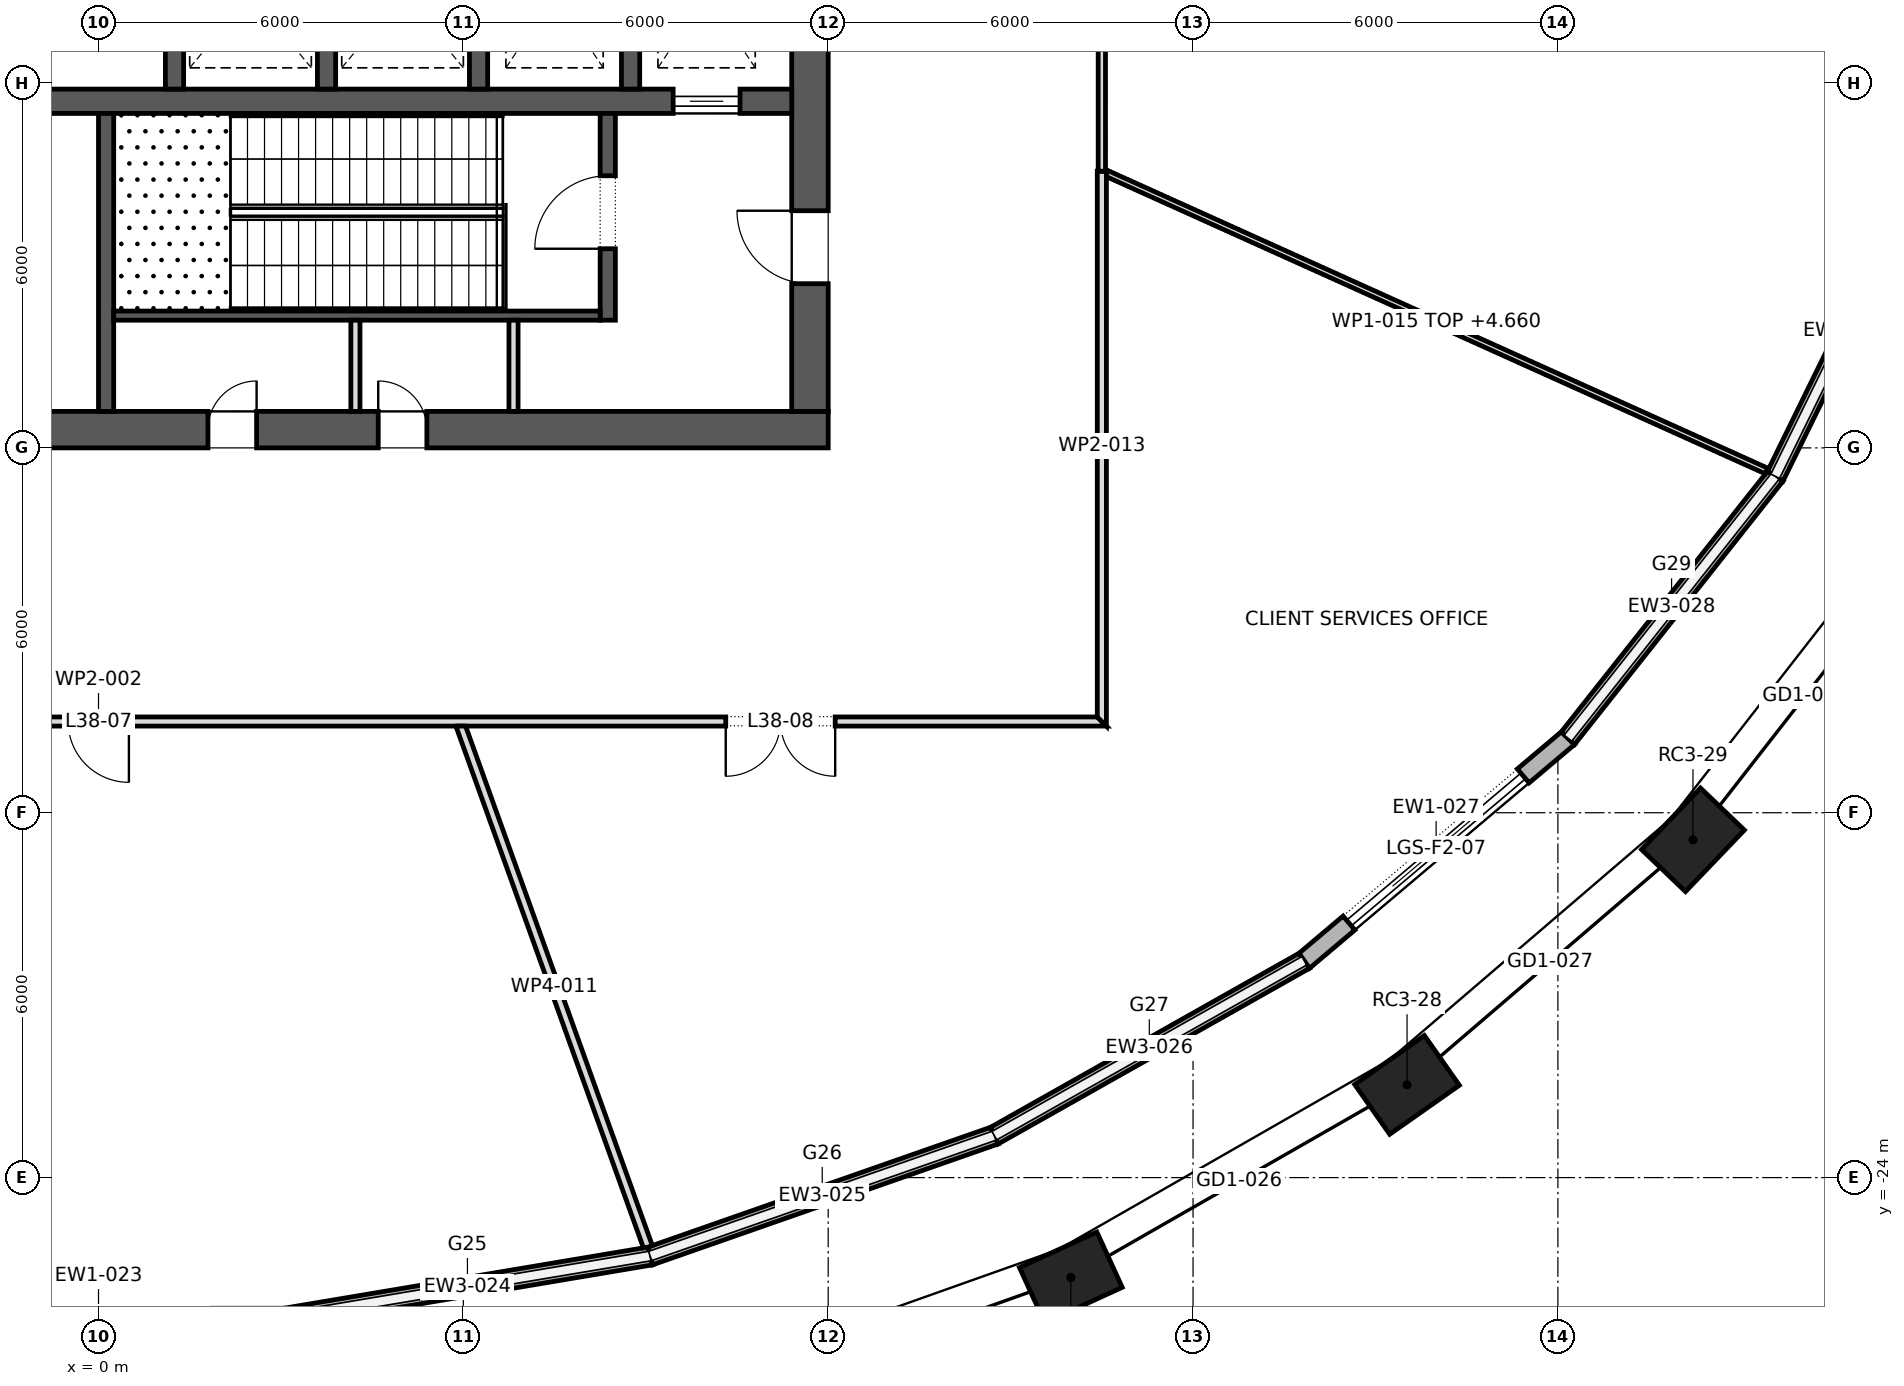
"""IFC4 building model, lengths in metres.
Left out: names, types, materials, properties, quantities, classifications, styles, units other than length and angle.
Written with IfcOpenShell. Run it as: python <this file> out.ifc"""

import sys

from ifc_helpers import new_model, si_unit, direction, frame, frame_2d, origin, origin_2d, place, context, subcontext, project, spatial, polyline, rectangle, outline, extrude, element, fill, save


model = new_model("IFC4")
c1 = context("Model", 3, precision=1e-05, world=origin(), true_north=direction((0.0, 1.0)))
c2 = subcontext(c1, "Body", "Model", "MODEL_VIEW")
j1 = project(units=[si_unit("LENGTHUNIT", "METRE"), si_unit("PLANEANGLEUNIT", "RADIAN")], contexts=[c1])
p1 = place(None, origin())
s1 = spatial("IfcSite", under=j1, at=p1, CompositionType="ELEMENT")
p2 = place(p1, origin())
s2 = spatial("IfcBuilding", under=s1, at=p2, CompositionType="ELEMENT")
p3 = place(p2, frame((0.0, 0.0, 167.5)))
s3 = spatial("IfcBuildingStorey", under=s2, at=p3, CompositionType="ELEMENT", Elevation=167.5)
for number, where, z_axis, x_axis in (
    (1, (15.99, -25.642, 0.0), (0.0, 0.0, 1.0), (0.909, 0.417, 0.0)),
    (2, (21.519, -22.475, 0.0), (0.0, 0.0, 1.0), (0.818, 0.575, 0.0)),
    (3, (26.221, -18.445, 0.0), (0.0, 0.0, 1.0), (0.692, 0.722, 0.0)),
):
    element("IfcColumn", number, at=place(p3, frame(where, z_axis=z_axis, x_axis=x_axis)), inside=s3, PredefinedType="COLUMN", context=c2, shape_type="SweptSolid", body=[
        extrude(rectangle(XDim=1.4, YDim=1.0, at=origin_2d()), origin(), (0.0, 0.0, 1.0), 6.0),
    ])
p4 = place(p3, frame((-12.0, -11.7, 0.0), z_axis=(0.0, 0.0, 1.0), x_axis=(1.0, 0.0, 0.0)))
e4 = element("IfcWall", 4, at=p4, inside=s3, PredefinedType="SHEAR", context=c2, shape_type="SweptSolid", body=[
    extrude(rectangle(XDim=24.0, YDim=0.6, at=frame_2d((12.0, 0.0))), origin(), (0.0, 0.0, 1.0), 6.0),
])
p5 = place(p4, frame((9.975, 0.0, 0.0)))
e5 = element("IfcOpeningElement", 5, at=p5, cuts=e4, PredefinedType="OPENING", context=c2, shape_type="SweptSolid", body=[
    extrude(rectangle(XDim=0.9, YDim=2.1, at=frame_2d((0.45, 1.05))), frame((0.0, 0.312, 0.0), z_axis=(0.0, -1.0, 0.0), x_axis=(1.0, 0.0, 0.0)), (0.0, 0.0, 1.0), 0.624),
])
p6 = place(p4, frame((4.2, 0.0, 0.0)))
e6 = element("IfcOpeningElement", 6, at=p6, cuts=e4, PredefinedType="OPENING", context=c2, shape_type="SweptSolid", body=[
    extrude(rectangle(XDim=0.8, YDim=2.1, at=frame_2d((0.4, 1.05))), frame((0.0, 0.312, 0.0), z_axis=(0.0, -1.0, 0.0), x_axis=(1.0, 0.0, 0.0)), (0.0, 0.0, 1.0), 0.624),
])
p7 = place(p4, frame((13.8, 0.0, 0.0)))
e7 = element("IfcOpeningElement", 7, at=p7, cuts=e4, PredefinedType="OPENING", context=c2, shape_type="SweptSolid", body=[
    extrude(rectangle(XDim=0.8, YDim=2.1, at=frame_2d((0.4, 1.05))), frame((0.0, 0.312, 0.0), z_axis=(0.0, -1.0, 0.0), x_axis=(1.0, 0.0, 0.0)), (0.0, 0.0, 1.0), 0.624),
])
p8 = place(p4, frame((16.6, 0.0, 0.0)))
e8 = element("IfcOpeningElement", 8, at=p8, cuts=e4, PredefinedType="OPENING", context=c2, shape_type="SweptSolid", body=[
    extrude(rectangle(XDim=0.8, YDim=2.1, at=frame_2d((0.4, 1.05))), frame((0.0, 0.312, 0.0), z_axis=(0.0, -1.0, 0.0), x_axis=(1.0, 0.0, 0.0)), (0.0, 0.0, 1.0), 0.624),
])
p9 = place(p3, frame((11.7, -11.4, 0.0), z_axis=(0.0, 0.0, 1.0), x_axis=(0.0, 1.0, 0.0)))
e9 = element("IfcWall", 9, at=p9, inside=s3, PredefinedType="SHEAR", context=c2, shape_type="SweptSolid", body=[
    extrude(rectangle(XDim=22.8, YDim=0.6, at=frame_2d((11.4, 0.0))), origin(), (0.0, 0.0, 1.0), 6.0),
])
p10 = place(p9, frame((10.2, 0.0, 0.0)))
e10 = element("IfcOpeningElement", 10, at=p10, cuts=e9, PredefinedType="OPENING", context=c2, shape_type="SweptSolid", body=[
    extrude(rectangle(XDim=2.4, YDim=2.1, at=frame_2d((1.2, 1.05))), frame((0.0, 0.312, 0.0), z_axis=(0.0, -1.0, 0.0), x_axis=(1.0, 0.0, 0.0)), (0.0, 0.0, 1.0), 0.624),
])
p11 = place(p9, frame((19.5, 0.0, 0.0)))
e11 = element("IfcOpeningElement", 11, at=p11, cuts=e9, PredefinedType="OPENING", context=c2, shape_type="SweptSolid", body=[
    extrude(rectangle(XDim=1.2, YDim=2.1, at=frame_2d((0.6, 1.05))), frame((0.0, 0.312, 0.0), z_axis=(0.0, -1.0, 0.0), x_axis=(1.0, 0.0, 0.0)), (0.0, 0.0, 1.0), 0.624),
])
p12 = place(p9, frame((2.1, 0.0, 0.0)))
e12 = element("IfcOpeningElement", 12, at=p12, cuts=e9, PredefinedType="OPENING", context=c2, shape_type="SweptSolid", body=[
    extrude(rectangle(XDim=1.2, YDim=2.1, at=frame_2d((0.6, 1.05))), frame((0.0, 0.312, 0.0), z_axis=(0.0, -1.0, 0.0), x_axis=(1.0, 0.0, 0.0)), (0.0, 0.0, 1.0), 0.624),
])
p13 = place(p3, frame((-11.4, -6.3, 0.0), z_axis=(0.0, 0.0, 1.0), x_axis=(1.0, 0.0, 0.0)))
e13 = element("IfcWall", 13, at=p13, inside=s3, PredefinedType="SHEAR", context=c2, shape_type="SweptSolid", body=[
    extrude(rectangle(XDim=22.8, YDim=0.4, at=frame_2d((11.4, 0.0))), origin(), (0.0, 0.0, 1.0), 6.0),
])
p14 = place(p13, frame((20.85, 0.0, 0.0)))
e14 = element("IfcOpeningElement", 14, at=p14, cuts=e13, PredefinedType="OPENING", context=c2, shape_type="SweptSolid", body=[
    extrude(rectangle(XDim=1.1, YDim=2.1, at=frame_2d((0.55, 1.05))), frame((0.0, 0.212, 0.0), z_axis=(0.0, -1.0, 0.0), x_axis=(1.0, 0.0, 0.0)), (0.0, 0.0, 1.0), 0.424),
])
for number, where, z_axis, x_axis in (
    (15, (1.25, -6.1, 0.0), (0.0, 0.0, 1.0), (0.0, 1.0, 0.0)),
    (16, (3.75, -6.1, 0.0), (0.0, 0.0, 1.0), (0.0, 1.0, 0.0)),
    (17, (6.25, -6.1, 0.0), (0.0, 0.0, 1.0), (0.0, 1.0, 0.0)),
    (18, (8.75, -6.1, 0.0), (0.0, 0.0, 1.0), (0.0, 1.0, 0.0)),
):
    element("IfcWall", number, at=place(p3, frame(where, z_axis=z_axis, x_axis=x_axis)), inside=s3, PredefinedType="SHEAR", context=c2, shape_type="SweptSolid", body=[
        extrude(rectangle(XDim=2.9, YDim=0.3, at=frame_2d((1.45, 0.0))), origin(), (0.0, 0.0, 1.0), 6.0),
    ])
p15 = place(p3, frame((3.063, -26.299, 5.2), z_axis=(0.0, 0.0, 1.0), x_axis=(0.98618955457, 0.165620537547, 0.0)))
e19 = element("IfcWall", 19, at=p15, inside=s3, PredefinedType="STANDARD", context=c2, shape_type="SweptSolid", body=[
    extrude(outline(polyline([(-0.012, -0.15), (6.105, -0.15), (6.08, 0.15), (0.012, 0.15), (-0.012, -0.15)])), origin(), (0.0, 0.0, 1.0), 0.45),
])
p16 = place(p3, frame((9.071, -25.29, 5.2), z_axis=(0.0, 0.0, 1.0), x_axis=(0.943944636678, 0.330103806228, 0.0)))
e20 = element("IfcWall", 20, at=p16, inside=s3, PredefinedType="STANDARD", context=c2, shape_type="SweptSolid", body=[
    extrude(outline(polyline([(-0.013, -0.15), (6.011, -0.15), (5.984, 0.15), (0.013, 0.15), (-0.013, -0.15)])), origin(), (0.0, 0.0, 1.0), 0.45),
])
p17 = place(p3, frame((14.732, -23.31, 5.2), z_axis=(0.0, 0.0, 1.0), x_axis=(0.870982130072, 0.491314694565, 0.0)))
e21 = element("IfcWall", 21, at=p17, inside=s3, PredefinedType="STANDARD", context=c2, shape_type="SweptSolid", body=[
    extrude(outline(polyline([(-0.013, -0.15), (5.866, -0.15), (5.837, 0.15), (0.013, 0.15), (-0.013, -0.15)])), origin(), (0.0, 0.0, 1.0), 0.45),
])
p18 = place(p3, frame((19.829, -20.435, 0.0), z_axis=(0.0, 0.0, 1.0), x_axis=(0.764076096085, 0.645126126732, 0.0)))
e22 = element("IfcWall", 22, at=p18, inside=s3, PredefinedType="STANDARD", context=c2, shape_type="SweptSolid", body=[
    extrude(outline(polyline([(-0.014, -0.15), (5.69, -0.15), (5.66, 0.15), (0.014, 0.15), (-0.014, -0.15)])), origin(), (0.0, 0.0, 1.0), 5.65),
])
p19 = place(p18, frame((0.962, 0.0, 0.0)))
e23 = element("IfcOpeningElement", 23, at=p19, cuts=e22, PredefinedType="OPENING", context=c2, shape_type="SweptSolid", body=[
    extrude(rectangle(XDim=3.75, YDim=5.2, at=frame_2d((1.875, 2.6))), frame((0.0, 0.162, 0.0), z_axis=(0.0, -1.0, 0.0), x_axis=(1.0, 0.0, 0.0)), (0.0, 0.0, 1.0), 0.324),
])
p20 = place(p3, frame((24.165, -16.774, 5.2), z_axis=(0.0, 0.0, 1.0), x_axis=(0.620577705153, 0.784144955902, 0.0)))
e24 = element("IfcWall", 24, at=p20, inside=s3, PredefinedType="STANDARD", context=c2, shape_type="SweptSolid", body=[
    extrude(outline(polyline([(-0.015, -0.15), (5.509, -0.15), (5.477, 0.15), (0.015, 0.15), (-0.015, -0.15)])), origin(), (0.0, 0.0, 1.0), 0.45),
])
p21 = place(p3, frame((27.574, -12.467, 5.2), z_axis=(0.0, 0.0, 1.0), x_axis=(0.440444485575, 0.897779847806, 0.0)))
e25 = element("IfcWall", 25, at=p21, inside=s3, PredefinedType="STANDARD", context=c2, shape_type="SweptSolid", body=[
    extrude(outline(polyline([(-0.016, -0.15), (5.35, -0.15), (5.317, 0.15), (0.016, 0.15), (-0.016, -0.15)])), origin(), (0.0, 0.0, 1.0), 0.45),
])
p22 = place(p3, frame((0.125, -11.4, 0.0), z_axis=(0.0, 0.0, 1.0), x_axis=(0.0, 1.0, 0.0)))
e26 = element("IfcWall", 26, at=p22, inside=s3, PredefinedType="SHEAR", context=c2, shape_type="SweptSolid", body=[
    extrude(rectangle(XDim=4.9, YDim=0.25, at=frame_2d((2.45, 0.0))), origin(), (0.0, 0.0, 1.0), 5.65),
])
p23 = place(p3, frame((8.375, -9.9, 0.0), z_axis=(0.0, 0.0, 1.0), x_axis=(0.0, 1.0, 0.0)))
e27 = element("IfcWall", 27, at=p23, inside=s3, PredefinedType="SHEAR", context=c2, shape_type="SweptSolid", body=[
    extrude(rectangle(XDim=3.4, YDim=0.25, at=frame_2d((1.7, 0.0))), origin(), (0.0, 0.0, 1.0), 5.65),
])
p24 = place(p23, frame((1.175, 0.0, 0.0)))
e28 = element("IfcOpeningElement", 28, at=p24, cuts=e27, PredefinedType="OPENING", context=c2, shape_type="SweptSolid", body=[
    extrude(rectangle(XDim=1.2, YDim=2.1, at=frame_2d((0.6, 1.05))), frame((0.0, 0.137, 0.0), z_axis=(0.0, -1.0, 0.0), x_axis=(1.0, 0.0, 0.0)), (0.0, 0.0, 1.0), 0.274),
])
p25 = place(p3, frame((0.25, -9.825, 0.0), z_axis=(0.0, 0.0, 1.0), x_axis=(1.0, 0.0, 0.0)))
e29 = element("IfcWall", 29, at=p25, inside=s3, PredefinedType="SHEAR", context=c2, shape_type="SweptSolid", body=[
    extrude(rectangle(XDim=8.0, YDim=0.15, at=frame_2d((4.0, 0.0))), origin(), (0.0, 0.0, 1.0), 5.65),
])
for number, where, z_axis, x_axis in (
    (30, (4.225, -11.4, 0.0), (0.0, 0.0, 1.0), (0.0, 1.0, 0.0)),
    (31, (6.825, -11.4, 0.0), (0.0, 0.0, 1.0), (0.0, 1.0, 0.0)),
):
    element("IfcWall", number, at=place(p3, frame(where, z_axis=z_axis, x_axis=x_axis)), inside=s3, PredefinedType="PARTITIONING", context=c2, shape_type="SweptSolid", body=[
        extrude(rectangle(XDim=1.5, YDim=0.15, at=frame_2d((0.75, 0.0))), origin(), (0.0, 0.0, 1.0), 5.65),
    ])
p26 = place(p3, frame((-16.575, -16.5, 0.0), z_axis=(0.0, 0.0, 1.0), x_axis=(1.0, 0.0, 0.0)))
e32 = element("IfcWall", 32, at=p26, inside=s3, PredefinedType="PARTITIONING", context=c2, shape_type="SweptSolid", body=[
    extrude(outline(polyline([(0.0, -0.075), (1.95, -0.075), (3.9, -0.075), (5.85, -0.075), (7.8, -0.075), (9.75, -0.075), (11.7, -0.075), (13.65, -0.075), (15.6, -0.075), (17.55, -0.075), (19.5, -0.075), (21.45, -0.075), (23.4, -0.075), (25.35, -0.075), (27.3, -0.075), (29.25, -0.075), (31.2, -0.075), (33.15, -0.075), (33.0, 0.075), (31.068, 0.075), (29.135, 0.075), (27.203, 0.075), (25.271, 0.075), (23.338, 0.075), (21.406, 0.075), (19.473, 0.075), (17.541, 0.075), (15.609, 0.075), (13.677, 0.075), (11.744, 0.075), (9.812, 0.075), (7.879, 0.075), (5.947, 0.075), (4.015, 0.075), (2.082, 0.075), (0.15, 0.075), (0.0, -0.075)])), origin(), (0.0, 0.0, 1.0), 5.65),
])
p27 = place(p26, frame((4.46, 0.0, 0.0)))
e33 = element("IfcOpeningElement", 33, at=p27, cuts=e32, PredefinedType="OPENING", context=c2, shape_type="SweptSolid", body=[
    extrude(rectangle(XDim=1.8, YDim=2.1, at=frame_2d((0.9, 1.05))), frame((0.0, 0.087, 0.0), z_axis=(0.0, -1.0, 0.0), x_axis=(1.0, 0.0, 0.0)), (0.0, 0.0, 1.0), 0.174),
])
p28 = place(p26, frame((16.075, 0.0, 0.0)))
e34 = element("IfcOpeningElement", 34, at=p28, cuts=e32, PredefinedType="OPENING", context=c2, shape_type="SweptSolid", body=[
    extrude(rectangle(XDim=1.0, YDim=2.1, at=frame_2d((0.5, 1.05))), frame((0.0, 0.087, 0.0), z_axis=(0.0, -1.0, 0.0), x_axis=(1.0, 0.0, 0.0)), (0.0, 0.0, 1.0), 0.174),
])
p29 = place(p26, frame((26.89, 0.0, 0.0)))
e35 = element("IfcOpeningElement", 35, at=p29, cuts=e32, PredefinedType="OPENING", context=c2, shape_type="SweptSolid", body=[
    extrude(rectangle(XDim=1.8, YDim=2.1, at=frame_2d((0.9, 1.05))), frame((0.0, 0.087, 0.0), z_axis=(0.0, -1.0, 0.0), x_axis=(1.0, 0.0, 0.0)), (0.0, 0.0, 1.0), 0.174),
])
p30 = place(p3, frame((5.948, -16.55, 0.0), z_axis=(0.0, 0.0, 1.0), x_axis=(0.338254589268, -0.941054638605, 0.0)))
e36 = element("IfcWall", 36, at=p30, inside=s3, PredefinedType="PARTITIONING", context=c2, shape_type="SweptSolid", body=[
    extrude(outline(polyline([(0.0, -0.075), (1.824, -0.075), (3.647, -0.075), (5.471, -0.075), (7.295, -0.075), (9.118, -0.075), (9.131, -0.003), (9.132, 0.062), (9.132, 0.075), (7.316, 0.075), (5.5, 0.075), (3.685, 0.075), (1.869, 0.075), (0.054, 0.075), (0.0, -0.074), (0.0, -0.075)])), origin(), (0.0, 0.0, 1.0), 4.88),
])
p31 = place(p3, frame((16.5, -7.45, 0.0), z_axis=(0.0, 0.0, 1.0), x_axis=(0.0, -1.0, 0.0)))
e37 = element("IfcWall", 37, at=p31, inside=s3, PredefinedType="PARTITIONING", context=c2, shape_type="SweptSolid", body=[
    extrude(outline(polyline([(0.0, -0.075), (1.795, -0.075), (3.59, -0.075), (5.385, -0.075), (7.18, -0.075), (8.975, -0.075), (9.125, 0.075), (7.3, 0.075), (5.475, 0.075), (3.65, 0.075), (1.825, 0.075), (0.0, 0.075), (0.0, -0.075)])), origin(), (0.0, 0.0, 1.0), 5.65),
])
p32 = place(p3, frame((16.5, -7.45, 0.0), z_axis=(0.0, 0.0, 1.0), x_axis=(0.0, 1.0, 0.0)))
e38 = element("IfcWall", 38, at=p32, inside=s3, PredefinedType="PARTITIONING", context=c2, shape_type="SweptSolid", body=[
    extrude(rectangle(XDim=18.88, YDim=0.12, at=frame_2d((9.44, 0.0))), origin(), (0.0, 0.0, 1.0), 5.65),
])
p33 = place(p32, frame((3.51, 0.0, 0.0)))
e39 = element("IfcOpeningElement", 39, at=p33, cuts=e38, PredefinedType="OPENING", context=c2, shape_type="SweptSolid", body=[
    extrude(rectangle(XDim=1.8, YDim=2.1, at=frame_2d((0.9, 1.05))), frame((0.0, 0.072, 0.0), z_axis=(0.0, -1.0, 0.0), x_axis=(1.0, 0.0, 0.0)), (0.0, 0.0, 1.0), 0.144),
])
p34 = place(p32, frame((12.95, 0.0, 0.0)))
e40 = element("IfcOpeningElement", 40, at=p34, cuts=e38, PredefinedType="OPENING", context=c2, shape_type="SweptSolid", body=[
    extrude(rectangle(XDim=1.8, YDim=2.1, at=frame_2d((0.9, 1.05))), frame((0.0, 0.072, 0.0), z_axis=(0.0, -1.0, 0.0), x_axis=(1.0, 0.0, 0.0)), (0.0, 0.0, 1.0), 0.144),
])
p35 = place(p3, frame((16.54, -7.468, 0.0), z_axis=(0.0, 0.0, 1.0), x_axis=(0.911586306474, -0.411108751851, 0.0)))
e41 = element("IfcWall", 41, at=p35, inside=s3, PredefinedType="PARTITIONING", context=c2, shape_type="SweptSolid", body=[
    extrude(outline(polyline([(0.0, 0.05), (0.0, 0.049), (0.011, 0.025), (0.025, 0.031), (0.061, -0.05), (2.042, -0.05), (4.024, -0.05), (6.005, -0.05), (7.986, -0.05), (9.968, -0.05), (11.949, -0.05), (11.949, 0.05), (9.958, 0.05), (7.966, 0.05), (5.975, 0.05), (3.983, 0.05), (1.991, 0.05), (0.0, 0.05)])), origin(), (0.0, 0.0, 1.0), 4.66),
])
p36 = place(p19, origin())
e42 = element("IfcDoor", 42, at=p36, inside=s3, OperationType="DOUBLE_DOOR_SLIDING", PredefinedType="DOOR", context=c2, shape_type="SweptSolid", body=[
    extrude(rectangle(XDim=3.75, YDim=5.2, at=frame_2d((1.875, 2.6))), frame((0.0, 0.025, 0.0), z_axis=(0.0, -1.0, 0.0), x_axis=(1.0, 0.0, 0.0)), (0.0, 0.0, 1.0), 0.05),
])
fill(e23, e42)
p37 = place(p14, origin())
e43 = element("IfcDoor", 43, at=p37, inside=s3, OperationType="SLIDING_TO_LEFT", PredefinedType="DOOR", context=c2, shape_type="SweptSolid", body=[
    extrude(rectangle(XDim=1.1, YDim=2.1, at=frame_2d((0.55, 1.05))), frame((0.0, 0.025, 0.0), z_axis=(0.0, -1.0, 0.0), x_axis=(1.0, 0.0, 0.0)), (0.0, 0.0, 1.0), 0.05),
])
fill(e14, e43)
p38 = place(p24, origin())
e44 = element("IfcDoor", 44, at=p38, inside=s3, OperationType="SINGLE_SWING_RIGHT", PredefinedType="DOOR", context=c2, shape_type="SweptSolid", body=[
    extrude(rectangle(XDim=1.2, YDim=2.1, at=frame_2d((0.6, 1.05))), frame((0.0, 0.025, 0.0), z_axis=(0.0, -1.0, 0.0), x_axis=(1.0, 0.0, 0.0)), (0.0, 0.0, 1.0), 0.05),
])
fill(e28, e44)
p39 = place(p12, origin())
e45 = element("IfcDoor", 45, at=p39, inside=s3, OperationType="SINGLE_SWING_LEFT", PredefinedType="DOOR", context=c2, shape_type="SweptSolid", body=[
    extrude(rectangle(XDim=1.2, YDim=2.1, at=frame_2d((0.6, 1.05))), frame((0.0, 0.025, 0.0), z_axis=(0.0, -1.0, 0.0), x_axis=(1.0, 0.0, 0.0)), (0.0, 0.0, 1.0), 0.05),
])
fill(e12, e45)
p40 = place(p7, origin())
e46 = element("IfcDoor", 46, at=p40, inside=s3, OperationType="SINGLE_SWING_LEFT", PredefinedType="DOOR", context=c2, shape_type="SweptSolid", body=[
    extrude(rectangle(XDim=0.8, YDim=2.1, at=frame_2d((0.4, 1.05))), frame((0.0, 0.025, 0.0), z_axis=(0.0, -1.0, 0.0), x_axis=(1.0, 0.0, 0.0)), (0.0, 0.0, 1.0), 0.05),
])
fill(e7, e46)
p41 = place(p8, origin())
e47 = element("IfcDoor", 47, at=p41, inside=s3, OperationType="SINGLE_SWING_RIGHT", PredefinedType="DOOR", context=c2, shape_type="SweptSolid", body=[
    extrude(rectangle(XDim=0.8, YDim=2.1, at=frame_2d((0.4, 1.05))), frame((0.0, 0.025, 0.0), z_axis=(0.0, -1.0, 0.0), x_axis=(1.0, 0.0, 0.0)), (0.0, 0.0, 1.0), 0.05),
])
fill(e8, e47)
p42 = place(p28, frame((1.0, 0.0, 0.0), z_axis=(0.0, 0.0, 1.0), x_axis=(-1.0, 0.0, 0.0)))
e48 = element("IfcDoor", 48, at=p42, inside=s3, OperationType="SINGLE_SWING_RIGHT", PredefinedType="DOOR", context=c2, shape_type="SweptSolid", body=[
    extrude(rectangle(XDim=1.0, YDim=2.1, at=frame_2d((0.5, 1.05))), frame((0.0, 0.025, 0.0), z_axis=(0.0, -1.0, 0.0), x_axis=(1.0, 0.0, 0.0)), (0.0, 0.0, 1.0), 0.05),
])
fill(e34, e48)
p43 = place(p29, frame((1.8, 0.0, 0.0), z_axis=(0.0, 0.0, 1.0), x_axis=(-1.0, 0.0, 0.0)))
e49 = element("IfcDoor", 49, at=p43, inside=s3, OperationType="DOUBLE_DOOR_SINGLE_SWING", PredefinedType="DOOR", context=c2, shape_type="SweptSolid", body=[
    extrude(rectangle(XDim=1.8, YDim=2.1, at=frame_2d((0.9, 1.05))), frame((0.0, 0.025, 0.0), z_axis=(0.0, -1.0, 0.0), x_axis=(1.0, 0.0, 0.0)), (0.0, 0.0, 1.0), 0.05),
])
fill(e35, e49)
save(model, sys.argv[1])
